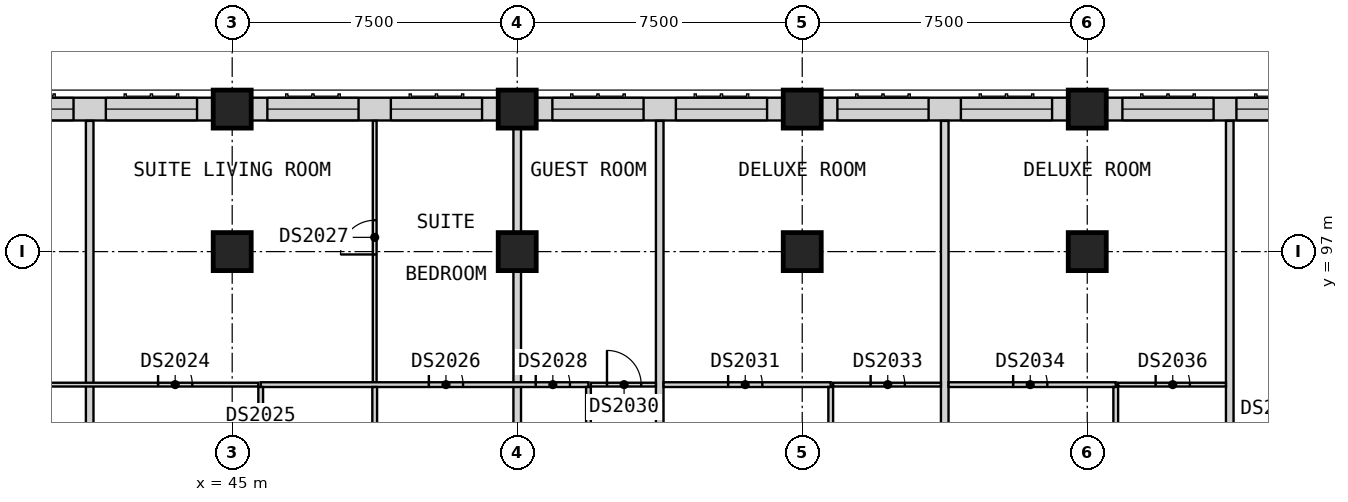
"""IFC4 building model, lengths in metres.
Left out: names, types, materials, properties, quantities, classifications, styles, units other than length and angle.
Written with IfcOpenShell. Run it as: python <this file> out.ifc"""

import sys

from ifc_helpers import new_model, si_unit, direction, frame, frame_2d, origin, origin_2d, place, context, subcontext, project, spatial, rectangle, extrude, element, fill, save


model = new_model("IFC4")
c1 = context("Model", 3, precision=1e-05, world=origin(), true_north=direction((0.0, 1.0)))
c2 = subcontext(c1, "Body", "Model", "MODEL_VIEW")
j1 = project(units=[si_unit("LENGTHUNIT", "METRE"), si_unit("PLANEANGLEUNIT", "RADIAN")], contexts=[c1])
p1 = place(None, origin())
s1 = spatial("IfcSite", under=j1, at=p1, CompositionType="ELEMENT")
p2 = place(p1, origin())
s2 = spatial("IfcBuilding", under=s1, at=p2, CompositionType="ELEMENT")
p3 = place(p2, frame((0.0, 0.0, 133.8)))
s3 = spatial("IfcBuildingStorey", under=s2, at=p3, CompositionType="ELEMENT", Elevation=133.8)
for number, where, z_axis, x_axis in (
    (1, (45.0, 100.75, 0.0), (0.0, 0.0, 1.0), (1.0, 0.0, 0.0)),
    (2, (52.5, 100.75, 0.0), (0.0, 0.0, 1.0), (1.0, 0.0, 0.0)),
    (3, (60.0, 100.75, 0.0), (0.0, 0.0, 1.0), (1.0, 0.0, 0.0)),
    (4, (67.5, 100.75, 0.0), (0.0, 0.0, 1.0), (1.0, 0.0, 0.0)),
    (5, (45.0, 97.0, 0.0), (0.0, 0.0, 1.0), (1.0, 0.0, 0.0)),
    (6, (52.5, 97.0, 0.0), (0.0, 0.0, 1.0), (1.0, 0.0, 0.0)),
    (7, (60.0, 97.0, 0.0), (0.0, 0.0, 1.0), (1.0, 0.0, 0.0)),
    (8, (67.5, 97.0, 0.0), (0.0, 0.0, 1.0), (1.0, 0.0, 0.0)),
):
    element("IfcColumn", number, at=place(p3, frame(where, z_axis=z_axis, x_axis=x_axis)), inside=s3, PredefinedType="COLUMN", context=c2, shape_type="SweptSolid", body=[
        extrude(rectangle(XDim=1.0, YDim=1.0, at=origin_2d()), origin(), (0.0, 0.0, 1.0), 3.6),
    ])
p4 = place(p3, frame((74.0, 100.75, 0.0), z_axis=(0.0, 0.0, 1.0), x_axis=(-1.0, 0.0, 0.0)))
e9 = element("IfcWall", 9, at=p4, inside=s3, PredefinedType="SOLIDWALL", context=c2, shape_type="SweptSolid", body=[
    extrude(rectangle(XDim=6.0, YDim=0.6, at=frame_2d((3.0, 0.0))), origin(), (0.0, 0.0, 1.0), 2.85),
])
p5 = place(p4, frame((3.175, 0.0, 0.8)))
e10 = element("IfcOpeningElement", 10, at=p5, cuts=e9, PredefinedType="OPENING", context=c2, shape_type="SweptSolid", body=[
    extrude(rectangle(XDim=2.4, YDim=1.8, at=frame_2d((1.2, 0.9))), frame((0.0, 0.31, 0.0), z_axis=(0.0, -1.0, 0.0), x_axis=(1.0, 0.0, 0.0)), (0.0, 0.0, 1.0), 0.62),
])
p6 = place(p4, frame((0.175, 0.0, 0.8)))
e11 = element("IfcOpeningElement", 11, at=p6, cuts=e9, PredefinedType="OPENING", context=c2, shape_type="SweptSolid", body=[
    extrude(rectangle(XDim=2.4, YDim=1.8, at=frame_2d((1.2, 0.9))), frame((0.0, 0.31, 0.0), z_axis=(0.0, -1.0, 0.0), x_axis=(1.0, 0.0, 0.0)), (0.0, 0.0, 1.0), 0.62),
])
p7 = place(p3, frame((67.0, 100.75, 0.0), z_axis=(0.0, 0.0, 1.0), x_axis=(-1.0, 0.0, 0.0)))
e12 = element("IfcWall", 12, at=p7, inside=s3, PredefinedType="SOLIDWALL", context=c2, shape_type="SweptSolid", body=[
    extrude(rectangle(XDim=6.5, YDim=0.6, at=frame_2d((3.25, 0.0))), origin(), (0.0, 0.0, 1.0), 2.85),
])
p8 = place(p7, frame((3.675, 0.0, 0.8)))
e13 = element("IfcOpeningElement", 13, at=p8, cuts=e12, PredefinedType="OPENING", context=c2, shape_type="SweptSolid", body=[
    extrude(rectangle(XDim=2.4, YDim=1.8, at=frame_2d((1.2, 0.9))), frame((0.0, 0.31, 0.0), z_axis=(0.0, -1.0, 0.0), x_axis=(1.0, 0.0, 0.0)), (0.0, 0.0, 1.0), 0.62),
])
p9 = place(p7, frame((0.425, 0.0, 0.8)))
e14 = element("IfcOpeningElement", 14, at=p9, cuts=e12, PredefinedType="OPENING", context=c2, shape_type="SweptSolid", body=[
    extrude(rectangle(XDim=2.4, YDim=1.8, at=frame_2d((1.2, 0.9))), frame((0.0, 0.31, 0.0), z_axis=(0.0, -1.0, 0.0), x_axis=(1.0, 0.0, 0.0)), (0.0, 0.0, 1.0), 0.62),
])
p10 = place(p3, frame((59.5, 100.75, 0.0), z_axis=(0.0, 0.0, 1.0), x_axis=(-1.0, 0.0, 0.0)))
e15 = element("IfcWall", 15, at=p10, inside=s3, PredefinedType="SOLIDWALL", context=c2, shape_type="SweptSolid", body=[
    extrude(rectangle(XDim=6.5, YDim=0.6, at=frame_2d((3.25, 0.0))), origin(), (0.0, 0.0, 1.0), 2.85),
])
p11 = place(p10, frame((3.675, 0.0, 0.8)))
e16 = element("IfcOpeningElement", 16, at=p11, cuts=e15, PredefinedType="OPENING", context=c2, shape_type="SweptSolid", body=[
    extrude(rectangle(XDim=2.4, YDim=1.8, at=frame_2d((1.2, 0.9))), frame((0.0, 0.31, 0.0), z_axis=(0.0, -1.0, 0.0), x_axis=(1.0, 0.0, 0.0)), (0.0, 0.0, 1.0), 0.62),
])
p12 = place(p10, frame((0.425, 0.0, 0.8)))
e17 = element("IfcOpeningElement", 17, at=p12, cuts=e15, PredefinedType="OPENING", context=c2, shape_type="SweptSolid", body=[
    extrude(rectangle(XDim=2.4, YDim=1.8, at=frame_2d((1.2, 0.9))), frame((0.0, 0.31, 0.0), z_axis=(0.0, -1.0, 0.0), x_axis=(1.0, 0.0, 0.0)), (0.0, 0.0, 1.0), 0.62),
])
p13 = place(p3, frame((52.0, 100.75, 0.0), z_axis=(0.0, 0.0, 1.0), x_axis=(-1.0, 0.0, 0.0)))
e18 = element("IfcWall", 18, at=p13, inside=s3, PredefinedType="SOLIDWALL", context=c2, shape_type="SweptSolid", body=[
    extrude(rectangle(XDim=6.5, YDim=0.6, at=frame_2d((3.25, 0.0))), origin(), (0.0, 0.0, 1.0), 2.85),
])
p14 = place(p13, frame((3.675, 0.0, 0.8)))
e19 = element("IfcOpeningElement", 19, at=p14, cuts=e18, PredefinedType="OPENING", context=c2, shape_type="SweptSolid", body=[
    extrude(rectangle(XDim=2.4, YDim=1.8, at=frame_2d((1.2, 0.9))), frame((0.0, 0.31, 0.0), z_axis=(0.0, -1.0, 0.0), x_axis=(1.0, 0.0, 0.0)), (0.0, 0.0, 1.0), 0.62),
])
p15 = place(p13, frame((0.425, 0.0, 0.8)))
e20 = element("IfcOpeningElement", 20, at=p15, cuts=e18, PredefinedType="OPENING", context=c2, shape_type="SweptSolid", body=[
    extrude(rectangle(XDim=2.4, YDim=1.8, at=frame_2d((1.2, 0.9))), frame((0.0, 0.31, 0.0), z_axis=(0.0, -1.0, 0.0), x_axis=(1.0, 0.0, 0.0)), (0.0, 0.0, 1.0), 0.62),
])
p16 = place(p3, frame((44.5, 100.75, 0.0), z_axis=(0.0, 0.0, 1.0), x_axis=(-1.0, 0.0, 0.0)))
e21 = element("IfcWall", 21, at=p16, inside=s3, PredefinedType="SOLIDWALL", context=c2, shape_type="SweptSolid", body=[
    extrude(rectangle(XDim=6.5, YDim=0.6, at=frame_2d((3.25, 0.0))), origin(), (0.0, 0.0, 1.0), 2.85),
])
p17 = place(p16, frame((3.675, 0.0, 0.8)))
e22 = element("IfcOpeningElement", 22, at=p17, cuts=e21, PredefinedType="OPENING", context=c2, shape_type="SweptSolid", body=[
    extrude(rectangle(XDim=2.4, YDim=1.8, at=frame_2d((1.2, 0.9))), frame((0.0, 0.31, 0.0), z_axis=(0.0, -1.0, 0.0), x_axis=(1.0, 0.0, 0.0)), (0.0, 0.0, 1.0), 0.62),
])
p18 = place(p16, frame((0.425, 0.0, 0.8)))
e23 = element("IfcOpeningElement", 23, at=p18, cuts=e21, PredefinedType="OPENING", context=c2, shape_type="SweptSolid", body=[
    extrude(rectangle(XDim=2.4, YDim=1.8, at=frame_2d((1.2, 0.9))), frame((0.0, 0.31, 0.0), z_axis=(0.0, -1.0, 0.0), x_axis=(1.0, 0.0, 0.0)), (0.0, 0.0, 1.0), 0.62),
])
p19 = place(p3, frame((41.25, 88.725, 0.0), z_axis=(0.0, 0.0, 1.0), x_axis=(0.0, 1.0, 0.0)))
e24 = element("IfcWall", 24, at=p19, inside=s3, PredefinedType="PARTITIONING", context=c2, shape_type="SweptSolid", body=[
    extrude(rectangle(XDim=11.715, YDim=0.2, at=frame_2d((5.857, 0.0))), origin(), (0.0, 0.0, 1.0), 3.35),
])
p20 = place(p3, frame((52.5, 88.725, 0.0), z_axis=(0.0, 0.0, 1.0), x_axis=(0.0, 1.0, 0.0)))
e25 = element("IfcWall", 25, at=p20, inside=s3, PredefinedType="PARTITIONING", context=c2, shape_type="SweptSolid", body=[
    extrude(rectangle(XDim=12.525, YDim=0.2, at=frame_2d((6.262, 0.0))), origin(), (0.0, 0.0, 1.0), 3.35),
])
for number, where, z_axis, x_axis in (
    (26, (56.25, 88.725, 0.0), (0.0, 0.0, 1.0), (0.0, 1.0, 0.0)),
    (27, (63.75, 88.725, 0.0), (0.0, 0.0, 1.0), (0.0, 1.0, 0.0)),
    (28, (71.25, 88.725, 0.0), (0.0, 0.0, 1.0), (0.0, 1.0, 0.0)),
):
    element("IfcWall", number, at=place(p3, frame(where, z_axis=z_axis, x_axis=x_axis)), inside=s3, PredefinedType="PARTITIONING", context=c2, shape_type="SweptSolid", body=[
        extrude(rectangle(XDim=11.715, YDim=0.2, at=frame_2d((5.857, 0.0))), origin(), (0.0, 0.0, 1.0), 3.35),
    ])
p21 = place(p3, frame((33.812, 93.5, 0.0), z_axis=(0.0, 0.0, 1.0), x_axis=(1.0, 0.0, 0.0)))
e29 = element("IfcWall", 29, at=p21, inside=s3, PredefinedType="PARTITIONING", context=c2, shape_type="SweptSolid", body=[
    extrude(rectangle(XDim=11.875, YDim=0.1, at=frame_2d((5.938, 0.0))), origin(), (0.0, 0.0, 1.0), 3.35),
])
p22 = place(p21, frame((5.113, 0.0, 0.0)))
e30 = element("IfcOpeningElement", 30, at=p22, cuts=e29, PredefinedType="OPENING", context=c2, shape_type="SweptSolid", body=[
    extrude(rectangle(XDim=0.9, YDim=2.1, at=frame_2d((0.45, 1.05))), frame((0.0, 0.06, 0.0), z_axis=(0.0, -1.0, 0.0), x_axis=(1.0, 0.0, 0.0)), (0.0, 0.0, 1.0), 0.12),
])
p23 = place(p21, frame((9.238, 0.0, 0.0)))
e31 = element("IfcOpeningElement", 31, at=p23, cuts=e29, PredefinedType="OPENING", context=c2, shape_type="SweptSolid", body=[
    extrude(rectangle(XDim=0.9, YDim=2.1, at=frame_2d((0.45, 1.05))), frame((0.0, 0.06, 0.0), z_axis=(0.0, -1.0, 0.0), x_axis=(1.0, 0.0, 0.0)), (0.0, 0.0, 1.0), 0.12),
])
p24 = place(p3, frame((54.438, 93.5, 0.0), z_axis=(0.0, 0.0, 1.0), x_axis=(1.0, 0.0, 0.0)))
e32 = element("IfcWall", 32, at=p24, inside=s3, PredefinedType="PARTITIONING", context=c2, shape_type="SweptSolid", body=[
    extrude(rectangle(XDim=1.712, YDim=0.1, at=frame_2d((0.856, 0.0))), origin(), (0.0, 0.0, 1.0), 3.35),
])
p25 = place(p24, frame((0.425, 0.0, 0.0)))
e33 = element("IfcOpeningElement", 33, at=p25, cuts=e32, PredefinedType="OPENING", context=c2, shape_type="SweptSolid", body=[
    extrude(rectangle(XDim=0.9, YDim=2.1, at=frame_2d((0.45, 1.05))), frame((0.0, 0.06, 0.0), z_axis=(0.0, -1.0, 0.0), x_axis=(1.0, 0.0, 0.0)), (0.0, 0.0, 1.0), 0.12),
])
p26 = place(p3, frame((60.812, 93.5, 0.0), z_axis=(0.0, 0.0, 1.0), x_axis=(1.0, 0.0, 0.0)))
e34 = element("IfcWall", 34, at=p26, inside=s3, PredefinedType="PARTITIONING", context=c2, shape_type="SweptSolid", body=[
    extrude(rectangle(XDim=2.837, YDim=0.1, at=frame_2d((1.419, 0.0))), origin(), (0.0, 0.0, 1.0), 3.35),
])
p27 = place(p26, frame((0.988, 0.0, 0.0)))
e35 = element("IfcOpeningElement", 35, at=p27, cuts=e34, PredefinedType="OPENING", context=c2, shape_type="SweptSolid", body=[
    extrude(rectangle(XDim=0.9, YDim=2.1, at=frame_2d((0.45, 1.05))), frame((0.0, 0.06, 0.0), z_axis=(0.0, -1.0, 0.0), x_axis=(1.0, 0.0, 0.0)), (0.0, 0.0, 1.0), 0.12),
])
p28 = place(p3, frame((68.312, 93.5, 0.0), z_axis=(0.0, 0.0, 1.0), x_axis=(1.0, 0.0, 0.0)))
e36 = element("IfcWall", 36, at=p28, inside=s3, PredefinedType="PARTITIONING", context=c2, shape_type="SweptSolid", body=[
    extrude(rectangle(XDim=2.837, YDim=0.1, at=frame_2d((1.419, 0.0))), origin(), (0.0, 0.0, 1.0), 3.35),
])
p29 = place(p28, frame((0.988, 0.0, 0.0)))
e37 = element("IfcOpeningElement", 37, at=p29, cuts=e36, PredefinedType="OPENING", context=c2, shape_type="SweptSolid", body=[
    extrude(rectangle(XDim=0.9, YDim=2.1, at=frame_2d((0.45, 1.05))), frame((0.0, 0.06, 0.0), z_axis=(0.0, -1.0, 0.0), x_axis=(1.0, 0.0, 0.0)), (0.0, 0.0, 1.0), 0.12),
])
p30 = place(p3, frame((48.75, 93.562, 0.0), z_axis=(0.0, 0.0, 1.0), x_axis=(0.0, 1.0, 0.0)))
e38 = element("IfcWall", 38, at=p30, inside=s3, PredefinedType="PARTITIONING", context=c2, shape_type="SweptSolid", body=[
    extrude(rectangle(XDim=6.877, YDim=0.1, at=frame_2d((3.439, 0.0))), origin(), (0.0, 0.0, 1.0), 3.35),
])
p31 = place(p30, frame((3.363, 0.0, 0.0)))
e39 = element("IfcOpeningElement", 39, at=p31, cuts=e38, PredefinedType="OPENING", context=c2, shape_type="SweptSolid", body=[
    extrude(rectangle(XDim=0.9, YDim=2.1, at=frame_2d((0.45, 1.05))), frame((0.0, 0.06, 0.0), z_axis=(0.0, -1.0, 0.0), x_axis=(1.0, 0.0, 0.0)), (0.0, 0.0, 1.0), 0.12),
])
p32 = place(p3, frame((45.75, 93.5, 0.0), z_axis=(0.0, 0.0, 1.0), x_axis=(1.0, 0.0, 0.0)))
e40 = element("IfcWall", 40, at=p32, inside=s3, PredefinedType="PARTITIONING", context=c2, shape_type="SweptSolid", body=[
    extrude(rectangle(XDim=8.625, YDim=0.125, at=frame_2d((4.312, 0.0))), origin(), (0.0, 0.0, 1.0), 3.35),
])
p33 = place(p32, frame((4.425, 0.0, 0.0)))
e41 = element("IfcOpeningElement", 41, at=p33, cuts=e40, PredefinedType="OPENING", context=c2, shape_type="SweptSolid", body=[
    extrude(rectangle(XDim=0.9, YDim=2.1, at=frame_2d((0.45, 1.05))), frame((0.0, 0.073, 0.0), z_axis=(0.0, -1.0, 0.0), x_axis=(1.0, 0.0, 0.0)), (0.0, 0.0, 1.0), 0.145),
])
p34 = place(p32, frame((7.238, 0.0, 0.0)))
e42 = element("IfcOpeningElement", 42, at=p34, cuts=e40, PredefinedType="OPENING", context=c2, shape_type="SweptSolid", body=[
    extrude(rectangle(XDim=0.9, YDim=2.1, at=frame_2d((0.45, 1.05))), frame((0.0, 0.073, 0.0), z_axis=(0.0, -1.0, 0.0), x_axis=(1.0, 0.0, 0.0)), (0.0, 0.0, 1.0), 0.145),
])
p35 = place(p3, frame((56.35, 93.5, 0.0), z_axis=(0.0, 0.0, 1.0), x_axis=(1.0, 0.0, 0.0)))
e43 = element("IfcWall", 43, at=p35, inside=s3, PredefinedType="PARTITIONING", context=c2, shape_type="SweptSolid", body=[
    extrude(rectangle(XDim=4.4, YDim=0.125, at=frame_2d((2.2, 0.0))), origin(), (0.0, 0.0, 1.0), 3.35),
])
p36 = place(p35, frame((1.7, 0.0, 0.0)))
e44 = element("IfcOpeningElement", 44, at=p36, cuts=e43, PredefinedType="OPENING", context=c2, shape_type="SweptSolid", body=[
    extrude(rectangle(XDim=0.9, YDim=2.1, at=frame_2d((0.45, 1.05))), frame((0.0, 0.073, 0.0), z_axis=(0.0, -1.0, 0.0), x_axis=(1.0, 0.0, 0.0)), (0.0, 0.0, 1.0), 0.145),
])
p37 = place(p3, frame((63.85, 93.5, 0.0), z_axis=(0.0, 0.0, 1.0), x_axis=(1.0, 0.0, 0.0)))
e45 = element("IfcWall", 45, at=p37, inside=s3, PredefinedType="PARTITIONING", context=c2, shape_type="SweptSolid", body=[
    extrude(rectangle(XDim=4.4, YDim=0.125, at=frame_2d((2.2, 0.0))), origin(), (0.0, 0.0, 1.0), 3.35),
])
p38 = place(p37, frame((1.7, 0.0, 0.0)))
e46 = element("IfcOpeningElement", 46, at=p38, cuts=e45, PredefinedType="OPENING", context=c2, shape_type="SweptSolid", body=[
    extrude(rectangle(XDim=0.9, YDim=2.1, at=frame_2d((0.45, 1.05))), frame((0.0, 0.073, 0.0), z_axis=(0.0, -1.0, 0.0), x_axis=(1.0, 0.0, 0.0)), (0.0, 0.0, 1.0), 0.145),
])
p39 = place(p3, frame((45.75, 88.725, 0.0), z_axis=(0.0, 0.0, 1.0), x_axis=(0.0, 1.0, 0.0)))
e47 = element("IfcWall", 47, at=p39, inside=s3, PredefinedType="PARTITIONING", context=c2, shape_type="SweptSolid", body=[
    extrude(rectangle(XDim=4.712, YDim=0.125, at=frame_2d((2.356, 0.0))), origin(), (0.0, 0.0, 1.0), 3.35),
])
p40 = place(p39, frame((1.9, 0.0, 0.0)))
e48 = element("IfcOpeningElement", 48, at=p40, cuts=e47, PredefinedType="OPENING", context=c2, shape_type="SweptSolid", body=[
    extrude(rectangle(XDim=0.9, YDim=2.1, at=frame_2d((0.45, 1.05))), frame((0.0, 0.073, 0.0), z_axis=(0.0, -1.0, 0.0), x_axis=(1.0, 0.0, 0.0)), (0.0, 0.0, 1.0), 0.145),
])
for number, where, z_axis, x_axis in (
    (49, (48.75, 88.725, 0.0), (0.0, 0.0, 1.0), (0.0, 1.0, 0.0)),
    (50, (54.375, 88.725, 0.0), (0.0, 0.0, 1.0), (0.0, 1.0, 0.0)),
    (51, (60.75, 88.725, 0.0), (0.0, 0.0, 1.0), (0.0, 1.0, 0.0)),
    (52, (68.25, 88.725, 0.0), (0.0, 0.0, 1.0), (0.0, 1.0, 0.0)),
):
    element("IfcWall", number, at=place(p3, frame(where, z_axis=z_axis, x_axis=x_axis)), inside=s3, PredefinedType="PARTITIONING", context=c2, shape_type="SweptSolid", body=[
        extrude(rectangle(XDim=4.712, YDim=0.125, at=frame_2d((2.356, 0.0))), origin(), (0.0, 0.0, 1.0), 3.35),
    ])
p41 = place(p5, origin())
e53 = element("IfcWindow", 53, at=p41, inside=s3, PartitioningType="SINGLE_PANEL", PredefinedType="WINDOW", context=c2, shape_type="SweptSolid", body=[
    extrude(rectangle(XDim=2.4, YDim=1.8, at=frame_2d((1.2, 0.9))), frame((0.0, -0.07, 0.0), z_axis=(0.0, -1.0, 0.0), x_axis=(1.0, 0.0, 0.0)), (0.0, 0.0, 1.0), 0.06),
])
fill(e10, e53)
p42 = place(p6, origin())
e54 = element("IfcWindow", 54, at=p42, inside=s3, PartitioningType="SINGLE_PANEL", PredefinedType="WINDOW", context=c2, shape_type="SweptSolid", body=[
    extrude(rectangle(XDim=2.4, YDim=1.8, at=frame_2d((1.2, 0.9))), frame((0.0, -0.07, 0.0), z_axis=(0.0, -1.0, 0.0), x_axis=(1.0, 0.0, 0.0)), (0.0, 0.0, 1.0), 0.06),
])
fill(e11, e54)
p43 = place(p8, origin())
e55 = element("IfcWindow", 55, at=p43, inside=s3, PartitioningType="SINGLE_PANEL", PredefinedType="WINDOW", context=c2, shape_type="SweptSolid", body=[
    extrude(rectangle(XDim=2.4, YDim=1.8, at=frame_2d((1.2, 0.9))), frame((0.0, -0.07, 0.0), z_axis=(0.0, -1.0, 0.0), x_axis=(1.0, 0.0, 0.0)), (0.0, 0.0, 1.0), 0.06),
])
fill(e13, e55)
p44 = place(p9, origin())
e56 = element("IfcWindow", 56, at=p44, inside=s3, PartitioningType="SINGLE_PANEL", PredefinedType="WINDOW", context=c2, shape_type="SweptSolid", body=[
    extrude(rectangle(XDim=2.4, YDim=1.8, at=frame_2d((1.2, 0.9))), frame((0.0, -0.07, 0.0), z_axis=(0.0, -1.0, 0.0), x_axis=(1.0, 0.0, 0.0)), (0.0, 0.0, 1.0), 0.06),
])
fill(e14, e56)
p45 = place(p11, origin())
e57 = element("IfcWindow", 57, at=p45, inside=s3, PartitioningType="SINGLE_PANEL", PredefinedType="WINDOW", context=c2, shape_type="SweptSolid", body=[
    extrude(rectangle(XDim=2.4, YDim=1.8, at=frame_2d((1.2, 0.9))), frame((0.0, -0.07, 0.0), z_axis=(0.0, -1.0, 0.0), x_axis=(1.0, 0.0, 0.0)), (0.0, 0.0, 1.0), 0.06),
])
fill(e16, e57)
p46 = place(p12, origin())
e58 = element("IfcWindow", 58, at=p46, inside=s3, PartitioningType="SINGLE_PANEL", PredefinedType="WINDOW", context=c2, shape_type="SweptSolid", body=[
    extrude(rectangle(XDim=2.4, YDim=1.8, at=frame_2d((1.2, 0.9))), frame((0.0, -0.07, 0.0), z_axis=(0.0, -1.0, 0.0), x_axis=(1.0, 0.0, 0.0)), (0.0, 0.0, 1.0), 0.06),
])
fill(e17, e58)
p47 = place(p14, origin())
e59 = element("IfcWindow", 59, at=p47, inside=s3, PartitioningType="SINGLE_PANEL", PredefinedType="WINDOW", context=c2, shape_type="SweptSolid", body=[
    extrude(rectangle(XDim=2.4, YDim=1.8, at=frame_2d((1.2, 0.9))), frame((0.0, -0.07, 0.0), z_axis=(0.0, -1.0, 0.0), x_axis=(1.0, 0.0, 0.0)), (0.0, 0.0, 1.0), 0.06),
])
fill(e19, e59)
p48 = place(p15, origin())
e60 = element("IfcWindow", 60, at=p48, inside=s3, PartitioningType="SINGLE_PANEL", PredefinedType="WINDOW", context=c2, shape_type="SweptSolid", body=[
    extrude(rectangle(XDim=2.4, YDim=1.8, at=frame_2d((1.2, 0.9))), frame((0.0, -0.07, 0.0), z_axis=(0.0, -1.0, 0.0), x_axis=(1.0, 0.0, 0.0)), (0.0, 0.0, 1.0), 0.06),
])
fill(e20, e60)
p49 = place(p17, origin())
e61 = element("IfcWindow", 61, at=p49, inside=s3, PartitioningType="SINGLE_PANEL", PredefinedType="WINDOW", context=c2, shape_type="SweptSolid", body=[
    extrude(rectangle(XDim=2.4, YDim=1.8, at=frame_2d((1.2, 0.9))), frame((0.0, -0.07, 0.0), z_axis=(0.0, -1.0, 0.0), x_axis=(1.0, 0.0, 0.0)), (0.0, 0.0, 1.0), 0.06),
])
fill(e22, e61)
p50 = place(p18, origin())
e62 = element("IfcWindow", 62, at=p50, inside=s3, PartitioningType="SINGLE_PANEL", PredefinedType="WINDOW", context=c2, shape_type="SweptSolid", body=[
    extrude(rectangle(XDim=2.4, YDim=1.8, at=frame_2d((1.2, 0.9))), frame((0.0, -0.07, 0.0), z_axis=(0.0, -1.0, 0.0), x_axis=(1.0, 0.0, 0.0)), (0.0, 0.0, 1.0), 0.06),
])
fill(e23, e62)
p51 = place(p23, origin())
e63 = element("IfcDoor", 63, at=p51, inside=s3, OperationType="SINGLE_SWING_RIGHT", PredefinedType="DOOR", context=c2, shape_type="SweptSolid", body=[
    extrude(rectangle(XDim=0.9, YDim=2.1, at=frame_2d((0.45, 1.05))), frame((0.0, 0.025, 0.0), z_axis=(0.0, -1.0, 0.0), x_axis=(1.0, 0.0, 0.0)), (0.0, 0.0, 1.0), 0.05),
])
fill(e31, e63)
p52 = place(p33, origin())
e64 = element("IfcDoor", 64, at=p52, inside=s3, OperationType="SINGLE_SWING_RIGHT", PredefinedType="DOOR", context=c2, shape_type="SweptSolid", body=[
    extrude(rectangle(XDim=0.9, YDim=2.1, at=frame_2d((0.45, 1.05))), frame((0.0, 0.025, 0.0), z_axis=(0.0, -1.0, 0.0), x_axis=(1.0, 0.0, 0.0)), (0.0, 0.0, 1.0), 0.05),
])
fill(e41, e64)
p53 = place(p31, origin())
e65 = element("IfcDoor", 65, at=p53, inside=s3, OperationType="SINGLE_SWING_LEFT", PredefinedType="DOOR", context=c2, shape_type="SweptSolid", body=[
    extrude(rectangle(XDim=0.9, YDim=2.1, at=frame_2d((0.45, 1.05))), frame((0.0, 0.025, 0.0), z_axis=(0.0, -1.0, 0.0), x_axis=(1.0, 0.0, 0.0)), (0.0, 0.0, 1.0), 0.05),
])
fill(e39, e65)
p54 = place(p34, origin())
e66 = element("IfcDoor", 66, at=p54, inside=s3, OperationType="SINGLE_SWING_RIGHT", PredefinedType="DOOR", context=c2, shape_type="SweptSolid", body=[
    extrude(rectangle(XDim=0.9, YDim=2.1, at=frame_2d((0.45, 1.05))), frame((0.0, 0.025, 0.0), z_axis=(0.0, -1.0, 0.0), x_axis=(1.0, 0.0, 0.0)), (0.0, 0.0, 1.0), 0.05),
])
fill(e42, e66)
p55 = place(p25, origin())
e67 = element("IfcDoor", 67, at=p55, inside=s3, OperationType="SINGLE_SWING_RIGHT", PredefinedType="DOOR", context=c2, shape_type="SweptSolid", body=[
    extrude(rectangle(XDim=0.9, YDim=2.1, at=frame_2d((0.45, 1.05))), frame((0.0, 0.025, 0.0), z_axis=(0.0, -1.0, 0.0), x_axis=(1.0, 0.0, 0.0)), (0.0, 0.0, 1.0), 0.05),
])
fill(e33, e67)
p56 = place(p36, origin())
e68 = element("IfcDoor", 68, at=p56, inside=s3, OperationType="SINGLE_SWING_RIGHT", PredefinedType="DOOR", context=c2, shape_type="SweptSolid", body=[
    extrude(rectangle(XDim=0.9, YDim=2.1, at=frame_2d((0.45, 1.05))), frame((0.0, 0.025, 0.0), z_axis=(0.0, -1.0, 0.0), x_axis=(1.0, 0.0, 0.0)), (0.0, 0.0, 1.0), 0.05),
])
fill(e44, e68)
p57 = place(p27, origin())
e69 = element("IfcDoor", 69, at=p57, inside=s3, OperationType="SINGLE_SWING_RIGHT", PredefinedType="DOOR", context=c2, shape_type="SweptSolid", body=[
    extrude(rectangle(XDim=0.9, YDim=2.1, at=frame_2d((0.45, 1.05))), frame((0.0, 0.025, 0.0), z_axis=(0.0, -1.0, 0.0), x_axis=(1.0, 0.0, 0.0)), (0.0, 0.0, 1.0), 0.05),
])
fill(e35, e69)
p58 = place(p38, origin())
e70 = element("IfcDoor", 70, at=p58, inside=s3, OperationType="SINGLE_SWING_RIGHT", PredefinedType="DOOR", context=c2, shape_type="SweptSolid", body=[
    extrude(rectangle(XDim=0.9, YDim=2.1, at=frame_2d((0.45, 1.05))), frame((0.0, 0.025, 0.0), z_axis=(0.0, -1.0, 0.0), x_axis=(1.0, 0.0, 0.0)), (0.0, 0.0, 1.0), 0.05),
])
fill(e46, e70)
p59 = place(p29, origin())
e71 = element("IfcDoor", 71, at=p59, inside=s3, OperationType="SINGLE_SWING_RIGHT", PredefinedType="DOOR", context=c2, shape_type="SweptSolid", body=[
    extrude(rectangle(XDim=0.9, YDim=2.1, at=frame_2d((0.45, 1.05))), frame((0.0, 0.025, 0.0), z_axis=(0.0, -1.0, 0.0), x_axis=(1.0, 0.0, 0.0)), (0.0, 0.0, 1.0), 0.05),
])
fill(e37, e71)
save(model, sys.argv[1])
